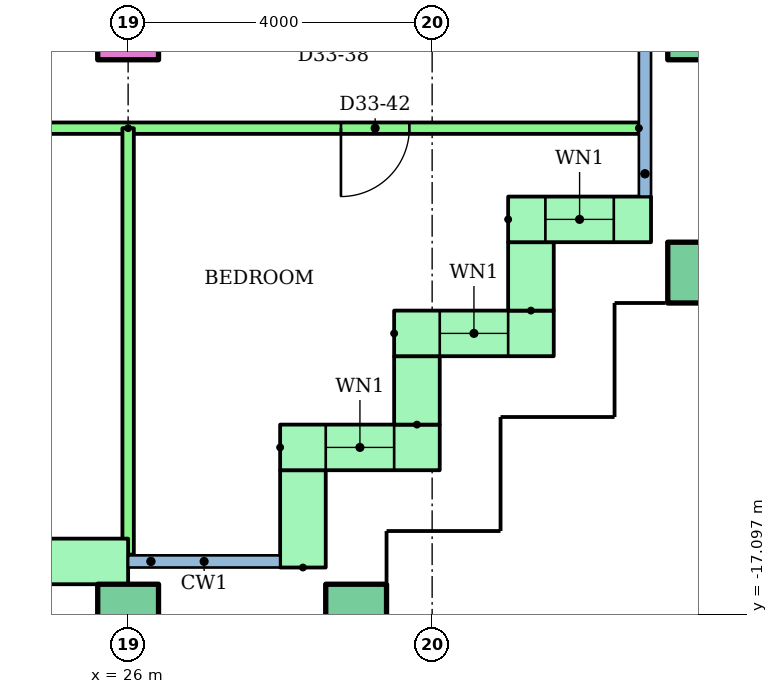
"""IFC4 building model, lengths in metres.
Left out: names, types, materials, properties, quantities, classifications, styles, units other than length and angle.
Written with IfcOpenShell. Run it as: python <this file> out.ifc"""

import sys

from ifc_helpers import new_model, si_unit, direction, frame, frame_2d, origin, origin_2d, place, context, subcontext, project, spatial, rectangle, hollow_rectangle, extrude, element, fill, save


model = new_model("IFC4")
c1 = context("Model", 3, precision=1e-05, world=origin(), true_north=direction((0.0, 1.0)))
c2 = subcontext(c1, "Body", "Model", "MODEL_VIEW")
j1 = project(units=[si_unit("LENGTHUNIT", "METRE"), si_unit("PLANEANGLEUNIT", "RADIAN")], contexts=[c1])
p1 = place(None, origin())
s1 = spatial("IfcSite", under=j1, at=p1, CompositionType="ELEMENT")
p2 = place(p1, origin())
s2 = spatial("IfcBuilding", under=s1, at=p2, CompositionType="ELEMENT")
p3 = place(p2, frame((0.0, 0.0, 129.4)))
s3 = spatial("IfcBuildingStorey", under=s2, at=p3, CompositionType="ELEMENT", Elevation=129.4)
for number, where in (
    (1, (26.0, -17.1, 0.0)),
    (2, (29.0, -17.1, 0.0)),
    (3, (33.5, -12.6, 0.0)),
):
    element("IfcColumn", number, at=place(p3, frame(where)), inside=s3, PredefinedType="COLUMN", context=c2, shape_type="SweptSolid", body=[
        extrude(hollow_rectangle(XDim=0.8, YDim=0.8, WallThickness=0.04, at=origin_2d()), origin(), (0.0, 0.0, 1.0), 3.2),
    ])
p4 = place(p3, frame((26.0, -9.4, 0.0)))
e4 = element("IfcColumn", 4, at=p4, inside=s3, PredefinedType="COLUMN", context=c2, shape_type="SweptSolid", body=[
    extrude(rectangle(XDim=0.8, YDim=0.8, at=origin_2d()), origin(), (0.0, 0.0, 1.0), 3.2),
])
p5 = place(p3, frame((33.5, -9.4, 0.0)))
e5 = element("IfcColumn", 5, at=p5, inside=s3, PredefinedType="COLUMN", context=c2, shape_type="SweptSolid", body=[
    extrude(hollow_rectangle(XDim=0.8, YDim=0.8, WallThickness=0.04, at=origin_2d()), origin(), (0.0, 0.0, 1.0), 3.2),
])
p6 = place(p3, frame((22.0, -16.4, 0.0)))
e6 = element("IfcWall", 6, at=p6, inside=s3, PredefinedType="STANDARD", context=c2, shape_type="SweptSolid", body=[
    extrude(rectangle(XDim=4.0, YDim=0.6, at=frame_2d((2.0, 0.0))), origin(), (0.0, 0.0, 1.0), 2.92),
])
p7 = place(p6, frame((1.4, 0.0, 0.0)))
e7 = element("IfcOpeningElement", 7, at=p7, cuts=e6, PredefinedType="OPENING", context=c2, shape_type="SweptSolid", body=[
    extrude(rectangle(XDim=1.2, YDim=2.1, at=frame_2d((0.6, 1.05))), frame((0.0, 0.31, 0.0), z_axis=(0.0, -1.0, 0.0), x_axis=(1.0, 0.0, 0.0)), (0.0, 0.0, 1.0), 0.62),
])
p8 = place(p3, frame((28.3, -16.48, 0.0), z_axis=(0.0, 0.0, 1.0), x_axis=(0.0, 1.0, 0.0)))
e8 = element("IfcWall", 8, at=p8, inside=s3, PredefinedType="STANDARD", context=c2, shape_type="SweptSolid", body=[
    extrude(rectangle(XDim=1.28, YDim=0.6, at=frame_2d((0.64, 0.0))), origin(), (0.0, 0.0, 1.0), 2.92),
])
p9 = place(p3, frame((28.0, -14.9, 0.0)))
e9 = element("IfcWall", 9, at=p9, inside=s3, PredefinedType="STANDARD", context=c2, shape_type="SweptSolid", body=[
    extrude(rectangle(XDim=2.1, YDim=0.6, at=frame_2d((1.05, 0.0))), origin(), (0.0, 0.0, 1.0), 2.92),
])
p10 = place(p9, frame((0.6, 0.0, 0.9)))
e10 = element("IfcOpeningElement", 10, at=p10, cuts=e9, PredefinedType="OPENING", context=c2, shape_type="SweptSolid", body=[
    extrude(rectangle(XDim=0.9, YDim=1.5, at=frame_2d((0.45, 0.75))), frame((0.0, 0.31, 0.0), z_axis=(0.0, -1.0, 0.0), x_axis=(1.0, 0.0, 0.0)), (0.0, 0.0, 1.0), 0.62),
])
p11 = place(p3, frame((29.8, -14.6, 0.0), z_axis=(0.0, 0.0, 1.0), x_axis=(0.0, 1.0, 0.0)))
e11 = element("IfcWall", 11, at=p11, inside=s3, PredefinedType="STANDARD", context=c2, shape_type="SweptSolid", body=[
    extrude(rectangle(XDim=0.9, YDim=0.6, at=frame_2d((0.45, 0.0))), origin(), (0.0, 0.0, 1.0), 2.92),
])
p12 = place(p3, frame((29.5, -13.4, 0.0)))
e12 = element("IfcWall", 12, at=p12, inside=s3, PredefinedType="STANDARD", context=c2, shape_type="SweptSolid", body=[
    extrude(rectangle(XDim=2.1, YDim=0.6, at=frame_2d((1.05, 0.0))), origin(), (0.0, 0.0, 1.0), 2.92),
])
p13 = place(p12, frame((0.6, 0.0, 0.9)))
e13 = element("IfcOpeningElement", 13, at=p13, cuts=e12, PredefinedType="OPENING", context=c2, shape_type="SweptSolid", body=[
    extrude(rectangle(XDim=0.9, YDim=1.5, at=frame_2d((0.45, 0.75))), frame((0.0, 0.31, 0.0), z_axis=(0.0, -1.0, 0.0), x_axis=(1.0, 0.0, 0.0)), (0.0, 0.0, 1.0), 0.62),
])
p14 = place(p3, frame((31.3, -13.1, 0.0), z_axis=(0.0, 0.0, 1.0), x_axis=(0.0, 1.0, 0.0)))
e14 = element("IfcWall", 14, at=p14, inside=s3, PredefinedType="STANDARD", context=c2, shape_type="SweptSolid", body=[
    extrude(rectangle(XDim=0.9, YDim=0.6, at=frame_2d((0.45, 0.0))), origin(), (0.0, 0.0, 1.0), 2.92),
])
p15 = place(p3, frame((31.0, -11.9, 0.0)))
e15 = element("IfcWall", 15, at=p15, inside=s3, PredefinedType="STANDARD", context=c2, shape_type="SweptSolid", body=[
    extrude(rectangle(XDim=1.88, YDim=0.6, at=frame_2d((0.94, 0.0))), origin(), (0.0, 0.0, 1.0), 2.92),
])
p16 = place(p15, frame((0.49, 0.0, 0.9)))
e16 = element("IfcOpeningElement", 16, at=p16, cuts=e15, PredefinedType="OPENING", context=c2, shape_type="SweptSolid", body=[
    extrude(rectangle(XDim=0.9, YDim=1.5, at=frame_2d((0.45, 0.75))), frame((0.0, 0.31, 0.0), z_axis=(0.0, -1.0, 0.0), x_axis=(1.0, 0.0, 0.0)), (0.0, 0.0, 1.0), 0.62),
])
p17 = place(p3, frame((32.72, -10.7, 0.0), z_axis=(0.0, 0.0, 1.0), x_axis=(-1.0, 0.0, 0.0)))
e17 = element("IfcWall", 17, at=p17, inside=s3, PredefinedType="PARTITIONING", context=c2, shape_type="SweptSolid", body=[
    extrude(rectangle(XDim=22.72, YDim=0.15, at=frame_2d((11.36, 0.0))), origin(), (0.0, 0.0, 1.0), 2.4),
])
p18 = place(p17, frame((20.27, 0.0, 0.0)))
e18 = element("IfcOpeningElement", 18, at=p18, cuts=e17, PredefinedType="OPENING", context=c2, shape_type="SweptSolid", body=[
    extrude(rectangle(XDim=0.9, YDim=2.1, at=frame_2d((0.45, 1.05))), frame((0.0, 0.085, 0.0), z_axis=(0.0, -1.0, 0.0), x_axis=(1.0, 0.0, 0.0)), (0.0, 0.0, 1.0), 0.17),
])
p19 = place(p17, frame((16.27, 0.0, 0.0)))
e19 = element("IfcOpeningElement", 19, at=p19, cuts=e17, PredefinedType="OPENING", context=c2, shape_type="SweptSolid", body=[
    extrude(rectangle(XDim=0.9, YDim=2.1, at=frame_2d((0.45, 1.05))), frame((0.0, 0.085, 0.0), z_axis=(0.0, -1.0, 0.0), x_axis=(1.0, 0.0, 0.0)), (0.0, 0.0, 1.0), 0.17),
])
p20 = place(p17, frame((10.22, 0.0, 0.0)))
e20 = element("IfcOpeningElement", 20, at=p20, cuts=e17, PredefinedType="OPENING", context=c2, shape_type="SweptSolid", body=[
    extrude(rectangle(XDim=1.0, YDim=2.1, at=frame_2d((0.5, 1.05))), frame((0.0, 0.085, 0.0), z_axis=(0.0, -1.0, 0.0), x_axis=(1.0, 0.0, 0.0)), (0.0, 0.0, 1.0), 0.17),
])
p21 = place(p17, frame((3.02, 0.0, 0.0)))
e21 = element("IfcOpeningElement", 21, at=p21, cuts=e17, PredefinedType="OPENING", context=c2, shape_type="SweptSolid", body=[
    extrude(rectangle(XDim=0.9, YDim=2.1, at=frame_2d((0.45, 1.05))), frame((0.0, 0.085, 0.0), z_axis=(0.0, -1.0, 0.0), x_axis=(1.0, 0.0, 0.0)), (0.0, 0.0, 1.0), 0.17),
])
p22 = place(p3, frame((26.0, -10.7, 0.0), z_axis=(0.0, 0.0, 1.0), x_axis=(0.0, -1.0, 0.0)))
e22 = element("IfcWall", 22, at=p22, inside=s3, PredefinedType="PARTITIONING", context=c2, shape_type="SweptSolid", body=[
    extrude(rectangle(XDim=5.61, YDim=0.15, at=frame_2d((2.805, 0.0))), origin(), (0.0, 0.0, 1.0), 2.4),
])
p23 = place(p10, origin())
e23 = element("IfcWindow", 23, at=p23, inside=s3, PartitioningType="SINGLE_PANEL", PredefinedType="WINDOW", context=c2, shape_type="SweptSolid", body=[
    extrude(rectangle(XDim=0.9, YDim=1.5, at=frame_2d((0.45, 0.75))), frame((0.0, 0.03, 0.0), z_axis=(0.0, -1.0, 0.0), x_axis=(1.0, 0.0, 0.0)), (0.0, 0.0, 1.0), 0.06),
])
fill(e10, e23)
p24 = place(p13, origin())
e24 = element("IfcWindow", 24, at=p24, inside=s3, PartitioningType="SINGLE_PANEL", PredefinedType="WINDOW", context=c2, shape_type="SweptSolid", body=[
    extrude(rectangle(XDim=0.9, YDim=1.5, at=frame_2d((0.45, 0.75))), frame((0.0, 0.03, 0.0), z_axis=(0.0, -1.0, 0.0), x_axis=(1.0, 0.0, 0.0)), (0.0, 0.0, 1.0), 0.06),
])
fill(e13, e24)
p25 = place(p16, origin())
e25 = element("IfcWindow", 25, at=p25, inside=s3, PartitioningType="SINGLE_PANEL", PredefinedType="WINDOW", context=c2, shape_type="SweptSolid", body=[
    extrude(rectangle(XDim=0.9, YDim=1.5, at=frame_2d((0.45, 0.75))), frame((0.0, 0.03, 0.0), z_axis=(0.0, -1.0, 0.0), x_axis=(1.0, 0.0, 0.0)), (0.0, 0.0, 1.0), 0.06),
])
fill(e16, e25)
p26 = place(p21, origin())
e26 = element("IfcDoor", 26, at=p26, inside=s3, OperationType="SINGLE_SWING_RIGHT", PredefinedType="DOOR", context=c2, shape_type="SweptSolid", body=[
    extrude(rectangle(XDim=0.9, YDim=2.1, at=frame_2d((0.45, 1.05))), frame((0.0, 0.025, 0.0), z_axis=(0.0, -1.0, 0.0), x_axis=(1.0, 0.0, 0.0)), (0.0, 0.0, 1.0), 0.05),
])
fill(e21, e26)
save(model, sys.argv[1])
